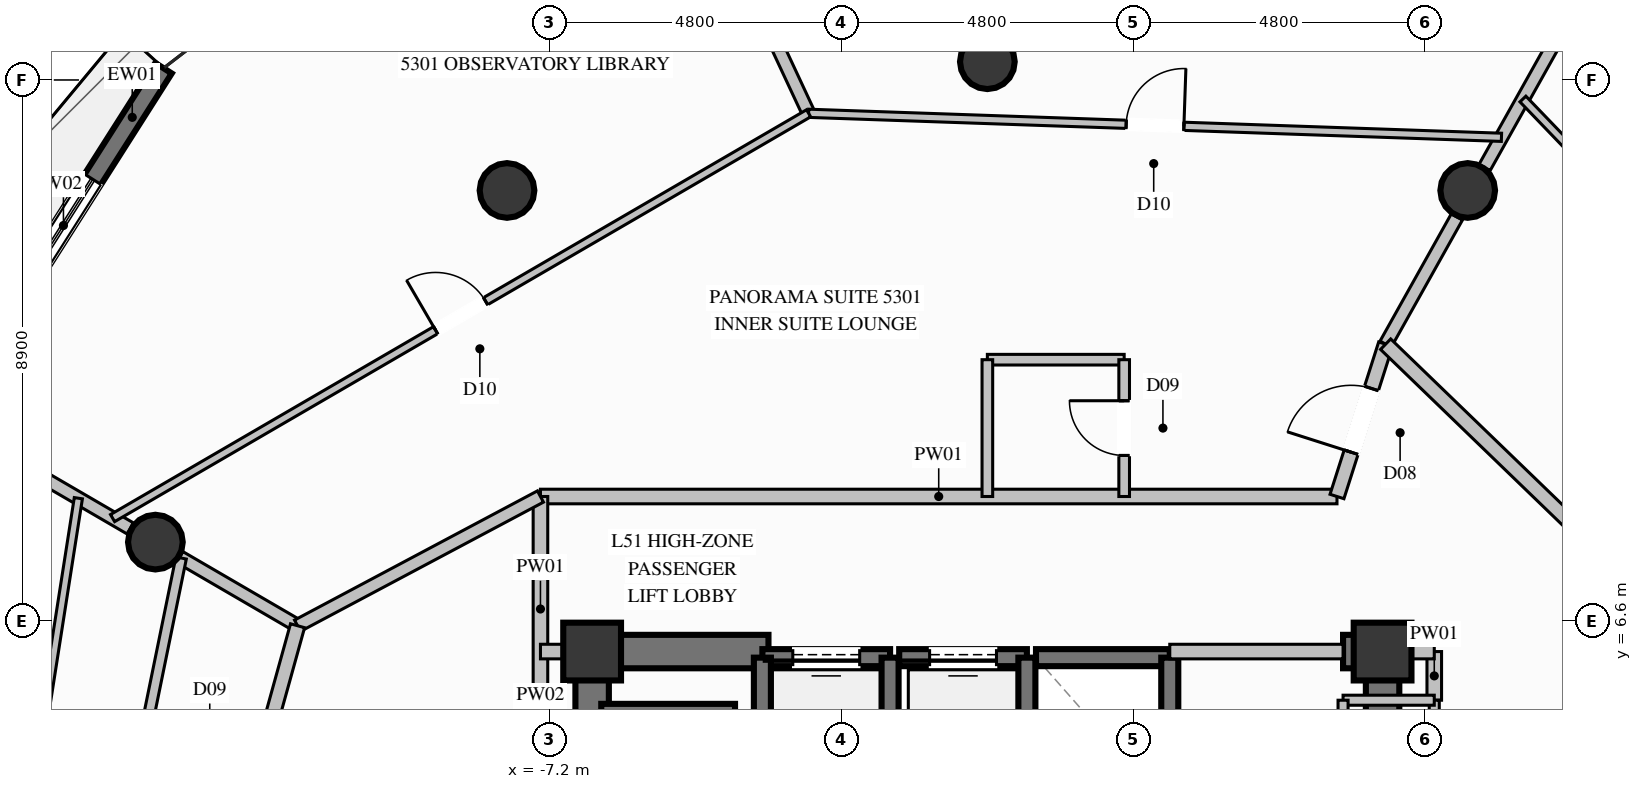
"""IFC4 building model, lengths in metres.
Left out: names, types, materials, properties, quantities, classifications, styles, units other than length and angle.
Written with IfcOpenShell. Run it as: python <this file> out.ifc"""

import sys

from ifc_helpers import new_model, si_unit, direction, frame, frame_2d, origin, origin_2d, place, context, subcontext, project, spatial, rectangle, circle, extrude, element, fill, save


model = new_model("IFC4")
c1 = context("Model", 3, precision=1e-05, world=origin(), true_north=direction((0.0, 1.0)))
c2 = subcontext(c1, "Body", "Model", "MODEL_VIEW")
j1 = project(units=[si_unit("LENGTHUNIT", "METRE"), si_unit("PLANEANGLEUNIT", "RADIAN")], contexts=[c1])
p1 = place(None, origin())
s1 = spatial("IfcSite", under=j1, at=p1, CompositionType="ELEMENT")
p2 = place(p1, origin())
s2 = spatial("IfcBuilding", under=s1, at=p2, CompositionType="ELEMENT")
p3 = place(p2, frame((0.0, 0.0, 198.4)))
s3 = spatial("IfcBuildingStorey", under=s2, at=p3, CompositionType="ELEMENT", Elevation=198.4)
for number, where, z_axis, x_axis in (
    (1, (6.5, 6.1, 0.0), (0.0, 0.0, 1.0), (1.0, 0.0, 0.0)),
    (2, (-6.5, 6.1, 0.0), (0.0, 0.0, 1.0), (1.0, 0.0, 0.0)),
):
    element("IfcColumn", number, at=place(p3, frame(where, z_axis=z_axis, x_axis=x_axis)), inside=s3, PredefinedType="COLUMN", context=c2, shape_type="SweptSolid", body=[
        extrude(rectangle(XDim=0.95, YDim=0.95, at=origin_2d()), origin(), (0.0, 0.0, 1.0), 3.6),
    ])
p4 = place(p3, frame((-6.225, 6.1, 0.0), z_axis=(0.0, 0.0, 1.0), x_axis=(1.0, 0.0, 0.0)))
e3 = element("IfcWall", 3, at=p4, inside=s3, PredefinedType="SHEAR", context=c2, shape_type="SweptSolid", body=[
    extrude(rectangle(XDim=2.625, YDim=0.55, at=frame_2d((1.312, 0.0))), origin(), (0.0, 0.0, 1.0), 3.6),
])
p5 = place(p3, frame((5.85, 6.1, 0.0), z_axis=(0.0, 0.0, 1.0), x_axis=(1.0, 0.0, 0.0)))
e4 = element("IfcWall", 4, at=p5, inside=s3, PredefinedType="SHEAR", context=c2, shape_type="SweptSolid", body=[
    extrude(rectangle(XDim=0.375, YDim=0.55, at=frame_2d((0.188, 0.0))), origin(), (0.0, 0.0, 1.0), 3.6),
])
p6 = place(p3, frame((-6.5, 2.35, 0.0), z_axis=(0.0, 0.0, 1.0), x_axis=(0.0, 1.0, 0.0)))
e5 = element("IfcWall", 5, at=p6, inside=s3, PredefinedType="SHEAR", context=c2, shape_type="SweptSolid", body=[
    extrude(rectangle(XDim=4.025, YDim=0.55, at=frame_2d((2.012, 0.0))), origin(), (0.0, 0.0, 1.0), 3.6),
])
p7 = place(p3, frame((6.5, 3.35, 0.0), z_axis=(0.0, 0.0, 1.0), x_axis=(0.0, 1.0, 0.0)))
e6 = element("IfcWall", 6, at=p7, inside=s3, PredefinedType="SHEAR", context=c2, shape_type="SweptSolid", body=[
    extrude(rectangle(XDim=3.025, YDim=0.55, at=frame_2d((1.512, 0.0))), origin(), (0.0, 0.0, 1.0), 3.6),
])
for number, where, z_axis, x_axis in (
    (7, (7.9, 13.683, 0.0), (0.0, 0.0, 1.0), (1.0, 0.0, 0.0)),
    (8, (0.0, 15.8, 0.0), (0.0, 0.0, 1.0), (1.0, 0.0, 0.0)),
    (9, (-7.9, 13.683, 0.0), (0.0, 0.0, 1.0), (1.0, 0.0, 0.0)),
    (10, (-13.683, 7.9, 0.0), (0.0, 0.0, 1.0), (1.0, 0.0, 0.0)),
):
    element("IfcColumn", number, at=place(p3, frame(where, z_axis=z_axis, x_axis=x_axis)), inside=s3, PredefinedType="COLUMN", context=c2, shape_type="SweptSolid", body=[
        extrude(circle(Radius=0.45, at=origin_2d()), origin(), (0.0, 0.0, 1.0), 3.6),
    ])
p8 = place(p3, frame((8.952, 18.408, 0.0), z_axis=(0.0, 0.0, 1.0), x_axis=(0.780172101925, -0.625564937778, 0.0)))
e11 = element("IfcWall", 11, at=p8, inside=s3, PredefinedType="SOLIDWALL", context=c2, shape_type="SweptSolid", body=[
    extrude(rectangle(XDim=6.637, YDim=0.32, at=frame_2d((3.318, 0.0))), origin(), (0.0, 0.0, 1.0), 3.36),
])
p9 = place(p8, frame((3.206, 0.0, 0.35)))
e12 = element("IfcOpeningElement", 12, at=p9, cuts=e11, PredefinedType="OPENING", context=c2, shape_type="SweptSolid", body=[
    extrude(rectangle(XDim=1.8, YDim=2.6, at=frame_2d((0.9, 1.3))), frame((0.0, 0.17, 0.0), z_axis=(0.0, -1.0, 0.0), x_axis=(1.0, 0.0, 0.0)), (0.0, 0.0, 1.0), 0.34),
])
p10 = place(p3, frame((-16.841, 10.52, 0.0), z_axis=(0.0, 0.0, 1.0), x_axis=(0.536805938934, 0.843705744869, 0.0)))
e13 = element("IfcWall", 13, at=p10, inside=s3, PredefinedType="SOLIDWALL", context=c2, shape_type="SweptSolid", body=[
    extrude(rectangle(XDim=6.133, YDim=0.32, at=frame_2d((3.066, 0.0))), origin(), (0.0, 0.0, 1.0), 3.36),
])
p11 = place(p10, frame((2.166, 0.0, 0.35)))
e14 = element("IfcOpeningElement", 14, at=p11, cuts=e13, PredefinedType="OPENING", context=c2, shape_type="SweptSolid", body=[
    extrude(rectangle(XDim=1.8, YDim=2.6, at=frame_2d((0.9, 1.3))), frame((0.0, 0.17, 0.0), z_axis=(0.0, -1.0, 0.0), x_axis=(1.0, 0.0, 0.0)), (0.0, 0.0, 1.0), 0.34),
])
p12 = place(p3, frame((-1.6, 6.0, 0.0), z_axis=(0.0, 0.0, 1.0), x_axis=(-1.0, 0.0, 0.0)))
e15 = element("IfcWall", 15, at=p12, inside=s3, PredefinedType="SOLIDWALL", context=c2, shape_type="SweptSolid", body=[
    extrude(rectangle(XDim=2.1, YDim=0.28, at=frame_2d((1.05, 0.0))), origin(), (0.0, 0.0, 1.0), 3.36),
])
p13 = place(p12, frame((0.5, 0.0, 0.0)))
e16 = element("IfcOpeningElement", 16, at=p13, cuts=e15, PredefinedType="OPENING", context=c2, shape_type="SweptSolid", body=[
    extrude(rectangle(XDim=1.1, YDim=2.2, at=frame_2d((0.55, 1.1))), frame((0.0, 0.15, 0.0), z_axis=(0.0, -1.0, 0.0), x_axis=(1.0, 0.0, 0.0)), (0.0, 0.0, 1.0), 0.3),
])
for number, where, z_axis, x_axis in (
    (17, (-3.7, 6.0, 0.0), (0.0, 0.0, 1.0), (0.0, -1.0, 0.0)),
    (18, (-1.6, 3.5, 0.0), (0.0, 0.0, 1.0), (0.0, 1.0, 0.0)),
):
    element("IfcWall", number, at=place(p3, frame(where, z_axis=z_axis, x_axis=x_axis)), inside=s3, PredefinedType="SOLIDWALL", context=c2, shape_type="SweptSolid", body=[
        extrude(rectangle(XDim=2.5, YDim=0.28, at=frame_2d((1.25, 0.0))), origin(), (0.0, 0.0, 1.0), 3.36),
    ])
p14 = place(p3, frame((0.65, 6.0, 0.0), z_axis=(0.0, 0.0, 1.0), x_axis=(-1.0, 0.0, 0.0)))
e19 = element("IfcWall", 19, at=p14, inside=s3, PredefinedType="SOLIDWALL", context=c2, shape_type="SweptSolid", body=[
    extrude(rectangle(XDim=2.1, YDim=0.28, at=frame_2d((1.05, 0.0))), origin(), (0.0, 0.0, 1.0), 3.36),
])
p15 = place(p14, frame((0.5, 0.0, 0.0)))
e20 = element("IfcOpeningElement", 20, at=p15, cuts=e19, PredefinedType="OPENING", context=c2, shape_type="SweptSolid", body=[
    extrude(rectangle(XDim=1.1, YDim=2.2, at=frame_2d((0.55, 1.1))), frame((0.0, 0.15, 0.0), z_axis=(0.0, -1.0, 0.0), x_axis=(1.0, 0.0, 0.0)), (0.0, 0.0, 1.0), 0.3),
])
p16 = place(p3, frame((0.65, 3.5, 0.0), z_axis=(0.0, 0.0, 1.0), x_axis=(0.0, 1.0, 0.0)))
e21 = element("IfcWall", 21, at=p16, inside=s3, PredefinedType="SOLIDWALL", context=c2, shape_type="SweptSolid", body=[
    extrude(rectangle(XDim=2.5, YDim=0.28, at=frame_2d((1.25, 0.0))), origin(), (0.0, 0.0, 1.0), 3.36),
])
p17 = place(p3, frame((3.0, 6.0, 0.0), z_axis=(0.0, 0.0, 1.0), x_axis=(-1.0, 0.0, 0.0)))
e22 = element("IfcWall", 22, at=p17, inside=s3, PredefinedType="SOLIDWALL", context=c2, shape_type="SweptSolid", body=[
    extrude(rectangle(XDim=2.2, YDim=0.28, at=frame_2d((1.1, 0.0))), origin(), (0.0, 0.0, 1.0), 3.36),
])
p18 = place(p3, frame((3.0, 3.5, 0.0), z_axis=(0.0, 0.0, 1.0), x_axis=(0.0, 1.0, 0.0)))
e23 = element("IfcWall", 23, at=p18, inside=s3, PredefinedType="SOLIDWALL", context=c2, shape_type="SweptSolid", body=[
    extrude(rectangle(XDim=2.5, YDim=0.28, at=frame_2d((1.25, 0.0))), origin(), (0.0, 0.0, 1.0), 3.36),
])
p19 = place(p3, frame((-4.15, 5.1, 0.0), z_axis=(0.0, 0.0, 1.0), x_axis=(-1.0, 0.0, 0.0)))
e24 = element("IfcWall", 24, at=p19, inside=s3, PredefinedType="SOLIDWALL", context=c2, shape_type="SweptSolid", body=[
    extrude(rectangle(XDim=2.2, YDim=0.28, at=frame_2d((1.1, 0.0))), origin(), (0.0, 0.0, 1.0), 3.36),
])
p20 = place(p3, frame((-7.35, 8.65, 0.0), z_axis=(0.0, 0.0, 1.0), x_axis=(1.0, 0.0, 0.0)))
e25 = element("IfcWall", 25, at=p20, inside=s3, PredefinedType="PARTITIONING", context=c2, shape_type="SweptSolid", body=[
    extrude(rectangle(XDim=13.1, YDim=0.24, at=frame_2d((6.55, 0.0))), origin(), (0.0, 0.0, 1.0), 3.36),
])
p21 = place(p3, frame((3.0, 6.1, 0.0), z_axis=(0.0, 0.0, 1.0), x_axis=(1.0, 0.0, 0.0)))
e26 = element("IfcWall", 26, at=p21, inside=s3, PredefinedType="PARTITIONING", context=c2, shape_type="SweptSolid", body=[
    extrude(rectangle(XDim=2.85, YDim=0.24, at=frame_2d((1.425, 0.0))), origin(), (0.0, 0.0, 1.0), 2.445),
])
p22 = place(p3, frame((7.35, 5.3, 0.0), z_axis=(0.0, 0.0, 1.0), x_axis=(0.0, 1.0, 0.0)))
e27 = element("IfcWall", 27, at=p22, inside=s3, PredefinedType="PARTITIONING", context=c2, shape_type="SweptSolid", body=[
    extrude(rectangle(XDim=0.8, YDim=0.24, at=frame_2d((0.4, 0.0))), origin(), (0.0, 0.0, 1.0), 2.445),
])
p23 = place(p3, frame((6.5, 6.1, 0.0), z_axis=(0.0, 0.0, 1.0), x_axis=(1.0, 0.0, 0.0)))
e28 = element("IfcWall", 28, at=p23, inside=s3, PredefinedType="PARTITIONING", context=c2, shape_type="SweptSolid", body=[
    extrude(rectangle(XDim=0.85, YDim=0.24, at=frame_2d((0.425, 0.0))), origin(), (0.0, 0.0, 1.0), 2.876),
])
p24 = place(p3, frame((-7.35, 4.95, 0.0), z_axis=(0.0, 0.0, 1.0), x_axis=(0.0, 1.0, 0.0)))
e29 = element("IfcWall", 29, at=p24, inside=s3, PredefinedType="PARTITIONING", context=c2, shape_type="SweptSolid", body=[
    extrude(rectangle(XDim=3.7, YDim=0.24, at=frame_2d((1.85, 0.0))), origin(), (0.0, 0.0, 1.0), 2.445),
])
p25 = place(p3, frame((-7.35, 6.1, 0.0), z_axis=(0.0, 0.0, 1.0), x_axis=(1.0, 0.0, 0.0)))
e30 = element("IfcWall", 30, at=p25, inside=s3, PredefinedType="PARTITIONING", context=c2, shape_type="SweptSolid", body=[
    extrude(rectangle(XDim=0.85, YDim=0.24, at=frame_2d((0.425, 0.0))), origin(), (0.0, 0.0, 1.0), 2.876),
])
p26 = place(p3, frame((7.35, 2.75, 0.0), z_axis=(0.0, 0.0, 1.0), x_axis=(0.0, 1.0, 0.0)))
e31 = element("IfcWall", 31, at=p26, inside=s3, PredefinedType="PARTITIONING", context=c2, shape_type="SweptSolid", body=[
    extrude(rectangle(XDim=2.55, YDim=0.165, at=frame_2d((1.275, 0.0))), origin(), (0.0, 0.0, 1.0), 3.36),
])
p27 = place(p26, frame((0.75, 0.0, 0.0)))
e32 = element("IfcOpeningElement", 32, at=p27, cuts=e31, PredefinedType="OPENING", context=c2, shape_type="SweptSolid", body=[
    extrude(rectangle(XDim=1.05, YDim=2.15, at=frame_2d((0.525, 1.075))), frame((0.0, 0.093, 0.0), z_axis=(0.0, -1.0, 0.0), x_axis=(1.0, 0.0, 0.0)), (0.0, 0.0, 1.0), 0.185),
])
p28 = place(p3, frame((7.35, 5.3, 0.0), z_axis=(0.0, 0.0, 1.0), x_axis=(-1.0, 0.0, 0.0)))
e33 = element("IfcWall", 33, at=p28, inside=s3, PredefinedType="PARTITIONING", context=c2, shape_type="SweptSolid", body=[
    extrude(rectangle(XDim=1.5, YDim=0.165, at=frame_2d((0.75, 0.0))), origin(), (0.0, 0.0, 1.0), 2.445),
])
p29 = place(p3, frame((5.85, 5.3, 0.0), z_axis=(0.0, 0.0, 1.0), x_axis=(0.0, -1.0, 0.0)))
e34 = element("IfcWall", 34, at=p29, inside=s3, PredefinedType="PARTITIONING", context=c2, shape_type="SweptSolid", body=[
    extrude(rectangle(XDim=2.55, YDim=0.165, at=frame_2d((1.275, 0.0))), origin(), (0.0, 0.0, 1.0), 2.445),
])
p30 = place(p3, frame((6.55, 11.155, 0.0), z_axis=(0.0, 0.0, 1.0), x_axis=(0.488535184748, 0.872544195593, 0.0)))
e35 = element("IfcWall", 35, at=p30, inside=s3, PredefinedType="PARTITIONING", context=c2, shape_type="SweptSolid", body=[
    extrude(rectangle(XDim=2.399, YDim=0.21, at=frame_2d((1.199, 0.0))), origin(), (0.0, 0.0, 1.0), 2.876),
])
p31 = place(p3, frame((8.178, 14.062, 0.0), z_axis=(0.0, 0.0, 1.0), x_axis=(0.488561310484, 0.872529567349, 0.0)))
e36 = element("IfcWall", 36, at=p31, inside=s3, PredefinedType="PARTITIONING", context=c2, shape_type="SweptSolid", body=[
    extrude(rectangle(XDim=3.889, YDim=0.21, at=frame_2d((1.944, 0.0))), origin(), (0.0, 0.0, 1.0), 3.36),
])
p32 = place(p3, frame((-11.345, 6.525, 0.0), z_axis=(0.0, 0.0, 1.0), x_axis=(-0.864228712324, 0.5030991282, 0.0)))
e37 = element("IfcWall", 37, at=p32, inside=s3, PredefinedType="PARTITIONING", context=c2, shape_type="SweptSolid", body=[
    extrude(rectangle(XDim=2.242, YDim=0.21, at=frame_2d((1.121, 0.0))), origin(), (0.0, 0.0, 1.0), 2.876),
])
p33 = place(p3, frame((-14.096, 8.125, 0.0), z_axis=(0.0, 0.0, 1.0), x_axis=(-0.864328084311, 0.50292838722, 0.0)))
e38 = element("IfcWall", 38, at=p33, inside=s3, PredefinedType="PARTITIONING", context=c2, shape_type="SweptSolid", body=[
    extrude(rectangle(XDim=3.334, YDim=0.21, at=frame_2d((1.667, 0.0))), origin(), (0.0, 0.0, 1.0), 3.36),
])
p34 = place(p3, frame((0.0, 10.9, 0.0), z_axis=(0.0, 0.0, 1.0), x_axis=(1.0, 0.0, 0.0)))
e39 = element("IfcWall", 39, at=p34, inside=s3, PredefinedType="PLUMBINGWALL", context=c2, shape_type="SweptSolid", body=[
    extrude(rectangle(XDim=2.25, YDim=0.175, at=frame_2d((1.125, 0.0))), origin(), (0.0, 0.0, 1.0), 3.042),
])
p35 = place(p3, frame((0.0, 10.9, 0.0), z_axis=(0.0, 0.0, 1.0), x_axis=(0.0, -1.0, 0.0)))
e40 = element("IfcWall", 40, at=p35, inside=s3, PredefinedType="PLUMBINGWALL", context=c2, shape_type="SweptSolid", body=[
    extrude(rectangle(XDim=2.25, YDim=0.175, at=frame_2d((1.125, 0.0))), origin(), (0.0, 0.0, 1.0), 3.36),
])
p36 = place(p3, frame((2.25, 8.65, 0.0), z_axis=(0.0, 0.0, 1.0), x_axis=(0.0, 1.0, 0.0)))
e41 = element("IfcWall", 41, at=p36, inside=s3, PredefinedType="PLUMBINGWALL", context=c2, shape_type="SweptSolid", body=[
    extrude(rectangle(XDim=2.25, YDim=0.175, at=frame_2d((1.125, 0.0))), origin(), (0.0, 0.0, 1.0), 3.36),
])
p37 = place(p36, frame((0.675, 0.0, 0.0)))
e42 = element("IfcOpeningElement", 42, at=p37, cuts=e41, PredefinedType="OPENING", context=c2, shape_type="SweptSolid", body=[
    extrude(rectangle(XDim=0.9, YDim=2.1, at=frame_2d((0.45, 1.05))), frame((0.0, 0.098, 0.0), z_axis=(0.0, -1.0, 0.0), x_axis=(1.0, 0.0, 0.0)), (0.0, 0.0, 1.0), 0.195),
])
p38 = place(p3, frame((-11.345, 6.525, 0.0), z_axis=(0.0, 0.0, 1.0), x_axis=(0.882866201619, 0.469624605445, 0.0)))
e43 = element("IfcWall", 43, at=p38, inside=s3, PredefinedType="PARTITIONING", context=c2, shape_type="SweptSolid", body=[
    extrude(rectangle(XDim=4.525, YDim=0.21, at=frame_2d((2.262, 0.0))), origin(), (0.0, 0.0, 1.0), 3.36),
])
p39 = place(p3, frame((5.75, 8.65, 0.0), z_axis=(0.0, 0.0, 1.0), x_axis=(0.304226604656, 0.952599691906, 0.0)))
e44 = element("IfcWall", 44, at=p39, inside=s3, PredefinedType="PARTITIONING", context=c2, shape_type="SweptSolid", body=[
    extrude(rectangle(XDim=2.63, YDim=0.24, at=frame_2d((1.315, 0.0))), origin(), (0.0, 0.0, 1.0), 3.36),
])
p40 = place(p39, frame((0.765, 0.0, 0.0)))
e45 = element("IfcOpeningElement", 45, at=p40, cuts=e44, PredefinedType="OPENING", context=c2, shape_type="SweptSolid", body=[
    extrude(rectangle(XDim=1.1, YDim=2.3, at=frame_2d((0.55, 1.15))), frame((0.0, 0.13, 0.0), z_axis=(0.0, -1.0, 0.0), x_axis=(1.0, 0.0, 0.0)), (0.0, 0.0, 1.0), 0.26),
])
p41 = place(p3, frame((-2.94, 14.952, 0.0), z_axis=(0.0, 0.0, 1.0), x_axis=(-0.422820045128, 0.906213666548, 0.0)))
e46 = element("IfcWall", 46, at=p41, inside=s3, PredefinedType="PARTITIONING", context=c2, shape_type="SweptSolid", body=[
    extrude(rectangle(XDim=5.925, YDim=0.21, at=frame_2d((2.962, 0.0))), origin(), (0.0, 0.0, 1.0), 3.36),
])
p42 = place(p3, frame((-2.94, 14.952, 0.0), z_axis=(0.0, 0.0, 1.0), x_axis=(0.999399675895, -0.034645170236, 0.0)))
e47 = element("IfcWall", 47, at=p42, inside=s3, PredefinedType="PARTITIONING", context=c2, shape_type="SweptSolid", body=[
    extrude(rectangle(XDim=11.402, YDim=0.135, at=frame_2d((5.701, 0.0))), origin(), (0.0, 0.0, 1.0), 2.929),
])
p43 = place(p42, frame((5.226, 0.0, 0.0)))
e48 = element("IfcOpeningElement", 48, at=p43, cuts=e47, PredefinedType="OPENING", context=c2, shape_type="SweptSolid", body=[
    extrude(rectangle(XDim=0.95, YDim=2.1, at=frame_2d((0.475, 1.05))), frame((0.0, 0.078, 0.0), z_axis=(0.0, -1.0, 0.0), x_axis=(1.0, 0.0, 0.0)), (0.0, 0.0, 1.0), 0.155),
])
p44 = place(p3, frame((-14.387, 8.295, 0.0), z_axis=(0.0, 0.0, 1.0), x_axis=(0.864450171357, 0.502718510939, 0.0)))
e49 = element("IfcWall", 49, at=p44, inside=s3, PredefinedType="PARTITIONING", context=c2, shape_type="SweptSolid", body=[
    extrude(rectangle(XDim=13.242, YDim=0.135, at=frame_2d((6.621, 0.0))), origin(), (0.0, 0.0, 1.0), 2.929),
])
p45 = place(p44, frame((6.146, 0.0, 0.0)))
e50 = element("IfcOpeningElement", 50, at=p45, cuts=e49, PredefinedType="OPENING", context=c2, shape_type="SweptSolid", body=[
    extrude(rectangle(XDim=0.95, YDim=2.1, at=frame_2d((0.475, 1.05))), frame((0.0, 0.078, 0.0), z_axis=(0.0, -1.0, 0.0), x_axis=(1.0, 0.0, 0.0)), (0.0, 0.0, 1.0), 0.155),
])
p46 = place(p3, frame((-11.345, 6.525, 0.0), z_axis=(0.0, 0.0, 1.0), x_axis=(-0.267401739017, -0.963585133743, 0.0)))
e51 = element("IfcWall", 51, at=p46, inside=s3, PredefinedType="PARTITIONING", context=c2, shape_type="SweptSolid", body=[
    extrude(rectangle(XDim=2.756, YDim=0.24, at=frame_2d((1.378, 0.0))), origin(), (0.0, 0.0, 1.0), 3.36),
])
p47 = place(p3, frame((-13.26, 7.639, 0.0), z_axis=(0.0, 0.0, 1.0), x_axis=(-0.200141353017, -0.979767032928, 0.0)))
e52 = element("IfcWall", 52, at=p47, inside=s3, PredefinedType="PLUMBINGWALL", context=c2, shape_type="SweptSolid", body=[
    extrude(rectangle(XDim=3.218, YDim=0.175, at=frame_2d((1.609, 0.0))), origin(), (0.0, 0.0, 1.0), 2.929),
])
p48 = place(p3, frame((-14.95, 8.622, 0.0), z_axis=(0.0, 0.0, 1.0), x_axis=(-0.154734004618, -0.98795616695, 0.0)))
e53 = element("IfcWall", 53, at=p48, inside=s3, PredefinedType="PARTITIONING", context=c2, shape_type="SweptSolid", body=[
    extrude(rectangle(XDim=8.654, YDim=0.135, at=frame_2d((4.327, 0.0))), origin(), (0.0, 0.0, 1.0), 2.929),
])
p49 = place(p48, frame((3.852, 0.0, 0.0)))
e54 = element("IfcOpeningElement", 54, at=p49, cuts=e53, PredefinedType="OPENING", context=c2, shape_type="SweptSolid", body=[
    extrude(rectangle(XDim=0.95, YDim=2.1, at=frame_2d((0.475, 1.05))), frame((0.0, 0.078, 0.0), z_axis=(0.0, -1.0, 0.0), x_axis=(1.0, 0.0, 0.0)), (0.0, 0.0, 1.0), 0.155),
])
p50 = place(p3, frame((11.345, 6.525, 0.0), z_axis=(0.0, 0.0, 1.0), x_axis=(-0.719360436772, 0.694637000172, 0.0)))
e55 = element("IfcWall", 55, at=p50, inside=s3, PredefinedType="PARTITIONING", context=c2, shape_type="SweptSolid", body=[
    extrude(rectangle(XDim=6.666, YDim=0.24, at=frame_2d((3.333, 0.0))), origin(), (0.0, 0.0, 1.0), 3.36),
])
p51 = place(p3, frame((15.059, 8.686, 0.0), z_axis=(0.0, 0.0, 1.0), x_axis=(-0.693110880217, 0.72083098416, 0.0)))
e56 = element("IfcWall", 56, at=p51, inside=s3, PredefinedType="PARTITIONING", context=c2, shape_type="SweptSolid", body=[
    extrude(rectangle(XDim=9.019, YDim=0.135, at=frame_2d((4.509, 0.0))), origin(), (0.0, 0.0, 1.0), 3.36),
])
p52 = place(p51, frame((4.034, 0.0, 0.0)))
e57 = element("IfcOpeningElement", 57, at=p52, cuts=e56, PredefinedType="OPENING", context=c2, shape_type="SweptSolid", body=[
    extrude(rectangle(XDim=0.95, YDim=2.1, at=frame_2d((0.475, 1.05))), frame((0.0, 0.078, 0.0), z_axis=(0.0, -1.0, 0.0), x_axis=(1.0, 0.0, 0.0)), (0.0, 0.0, 1.0), 0.155),
])
p53 = place(p11, origin())
e58 = element("IfcWindow", 58, at=p53, inside=s3, PartitioningType="SINGLE_PANEL", PredefinedType="WINDOW", context=c2, shape_type="SweptSolid", body=[
    extrude(rectangle(XDim=1.8, YDim=2.6, at=frame_2d((0.9, 1.3))), frame((0.0, 0.03, 0.0), z_axis=(0.0, -1.0, 0.0), x_axis=(1.0, 0.0, 0.0)), (0.0, 0.0, 1.0), 0.06),
])
fill(e14, e58)
p54 = place(p13, origin())
e59 = element("IfcDoor", 59, at=p54, inside=s3, OperationType="SLIDING_TO_LEFT", PredefinedType="DOOR", context=c2, shape_type="SweptSolid", body=[
    extrude(rectangle(XDim=1.1, YDim=2.2, at=frame_2d((0.55, 1.1))), frame((0.0, 0.025, 0.0), z_axis=(0.0, -1.0, 0.0), x_axis=(1.0, 0.0, 0.0)), (0.0, 0.0, 1.0), 0.05),
])
fill(e16, e59)
p55 = place(p15, origin())
e60 = element("IfcDoor", 60, at=p55, inside=s3, OperationType="SLIDING_TO_LEFT", PredefinedType="DOOR", context=c2, shape_type="SweptSolid", body=[
    extrude(rectangle(XDim=1.1, YDim=2.2, at=frame_2d((0.55, 1.1))), frame((0.0, 0.025, 0.0), z_axis=(0.0, -1.0, 0.0), x_axis=(1.0, 0.0, 0.0)), (0.0, 0.0, 1.0), 0.05),
])
fill(e20, e60)
p56 = place(p37, origin())
e61 = element("IfcDoor", 61, at=p56, inside=s3, OperationType="SINGLE_SWING_RIGHT", PredefinedType="DOOR", context=c2, shape_type="SweptSolid", body=[
    extrude(rectangle(XDim=0.9, YDim=2.1, at=frame_2d((0.45, 1.05))), frame((0.0, 0.025, 0.0), z_axis=(0.0, -1.0, 0.0), x_axis=(1.0, 0.0, 0.0)), (0.0, 0.0, 1.0), 0.05),
])
fill(e42, e61)
p57 = place(p40, origin())
e62 = element("IfcDoor", 62, at=p57, inside=s3, OperationType="SINGLE_SWING_LEFT", PredefinedType="DOOR", context=c2, shape_type="SweptSolid", body=[
    extrude(rectangle(XDim=1.1, YDim=2.3, at=frame_2d((0.55, 1.15))), frame((0.0, 0.025, 0.0), z_axis=(0.0, -1.0, 0.0), x_axis=(1.0, 0.0, 0.0)), (0.0, 0.0, 1.0), 0.05),
])
fill(e45, e62)
p58 = place(p43, origin())
e63 = element("IfcDoor", 63, at=p58, inside=s3, OperationType="SINGLE_SWING_RIGHT", PredefinedType="DOOR", context=c2, shape_type="SweptSolid", body=[
    extrude(rectangle(XDim=0.95, YDim=2.1, at=frame_2d((0.475, 1.05))), frame((0.0, 0.025, 0.0), z_axis=(0.0, -1.0, 0.0), x_axis=(1.0, 0.0, 0.0)), (0.0, 0.0, 1.0), 0.05),
])
fill(e48, e63)
p59 = place(p45, origin())
e64 = element("IfcDoor", 64, at=p59, inside=s3, OperationType="SINGLE_SWING_LEFT", PredefinedType="DOOR", context=c2, shape_type="SweptSolid", body=[
    extrude(rectangle(XDim=0.95, YDim=2.1, at=frame_2d((0.475, 1.05))), frame((0.0, 0.025, 0.0), z_axis=(0.0, -1.0, 0.0), x_axis=(1.0, 0.0, 0.0)), (0.0, 0.0, 1.0), 0.05),
])
fill(e50, e64)
save(model, sys.argv[1])
